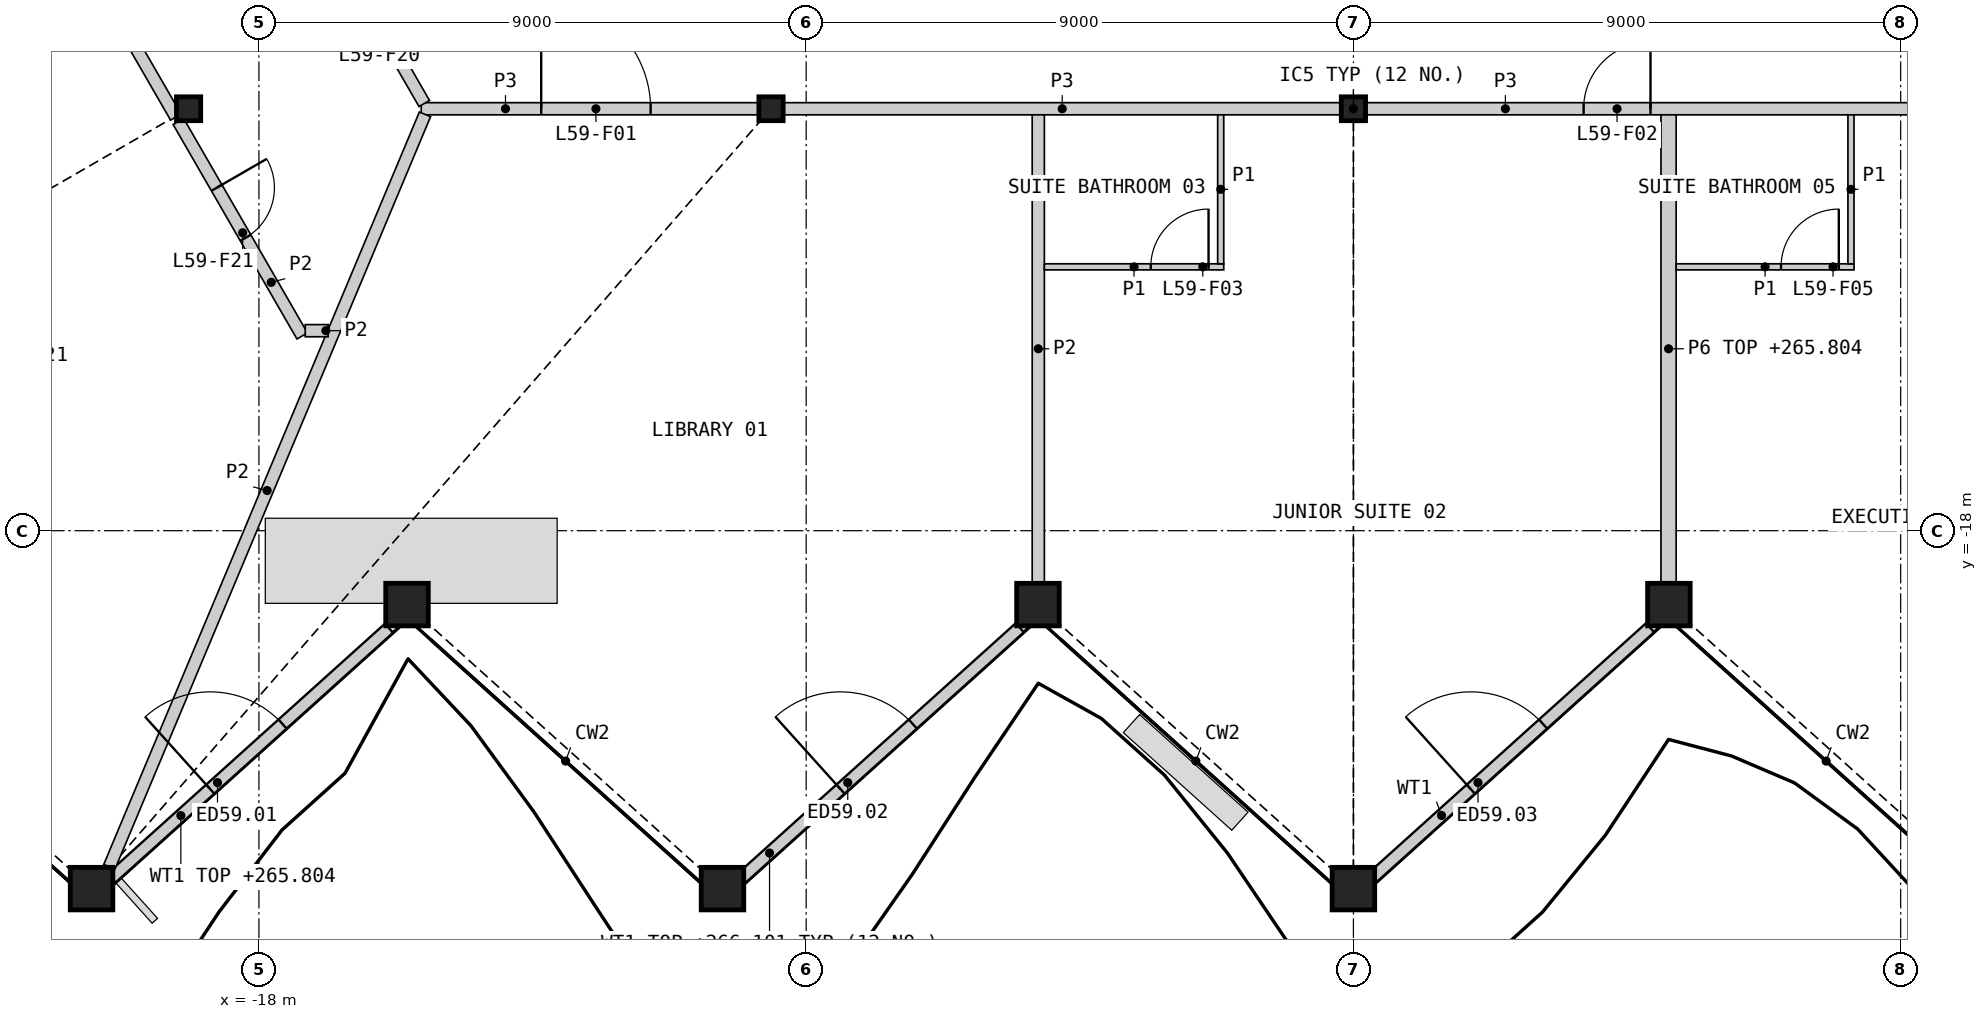
"""IFC4 building model, lengths in metres.
Left out: names, types, materials, properties, quantities, classifications, styles, units other than length and angle.
Written with IfcOpenShell. Run it as: python <this file> out.ifc"""

import sys

from ifc_helpers import new_model, si_unit, direction, frame, frame_2d, origin, origin_2d, place, context, subcontext, project, spatial, rectangle, hollow_rectangle, i_section, extrude, element, fill, save


model = new_model("IFC4")
c1 = context("Model", 3, precision=1e-05, world=origin(), true_north=direction((0.0, 1.0)))
c2 = subcontext(c1, "Body", "Model", "MODEL_VIEW")
j1 = project(units=[si_unit("LENGTHUNIT", "METRE"), si_unit("PLANEANGLEUNIT", "RADIAN")], contexts=[c1])
p1 = place(None, origin())
s1 = spatial("IfcSite", under=j1, at=p1, CompositionType="ELEMENT")
p2 = place(p1, origin())
s2 = spatial("IfcBuilding", under=s1, at=p2, CompositionType="ELEMENT")
p3 = place(p2, frame((0.0, 0.0, 263.4)))
s3 = spatial("IfcBuildingStorey", under=s2, at=p3, CompositionType="ELEMENT", Elevation=263.4)
for number, where, z_axis, x_axis in (
    (1, (-20.753, -23.887, 0.0), (0.0, 0.0, 1.0), (1.0, 0.0, 0.0)),
    (2, (-15.565, -19.215, 0.0), (0.0, 0.0, 1.0), (1.0, 0.0, 0.0)),
    (3, (-10.376, -23.887, 0.0), (0.0, 0.0, 1.0), (1.0, 0.0, 0.0)),
    (4, (-5.188, -19.215, 0.0), (0.0, 0.0, 1.0), (1.0, 0.0, 0.0)),
    (5, (0.0, -23.887, 0.0), (0.0, 0.0, 1.0), (1.0, 0.0, 0.0)),
    (6, (5.188, -19.215, 0.0), (0.0, 0.0, 1.0), (1.0, 0.0, 0.0)),
):
    element("IfcColumn", number, at=place(p3, frame(where, z_axis=z_axis, x_axis=x_axis)), inside=s3, PredefinedType="COLUMN", context=c2, shape_type="SweptSolid", body=[
        extrude(hollow_rectangle(XDim=0.7, YDim=0.7, WallThickness=0.045, at=origin_2d()), origin(), (0.0, 0.0, 1.0), 3.6),
    ])
for number, where, z_axis, x_axis in (
    (7, (-19.157, -11.06, 0.0), (0.0, 0.0, 1.0), (1.0, 0.0, 0.0)),
    (8, (-9.578, -11.06, 0.0), (0.0, 0.0, 1.0), (1.0, 0.0, 0.0)),
    (9, (0.0, -11.06, 0.0), (0.0, 0.0, 1.0), (1.0, 0.0, 0.0)),
):
    element("IfcColumn", number, at=place(p3, frame(where, z_axis=z_axis, x_axis=x_axis)), inside=s3, PredefinedType="COLUMN", context=c2, shape_type="SweptSolid", body=[
        extrude(i_section(OverallWidth=0.399, OverallDepth=0.393, WebThickness=0.023, FlangeThickness=0.037, at=origin_2d()), origin(), (0.0, 0.0, 1.0), 3.6),
    ])
p4 = place(p3, frame((-20.425, -23.713, 0.0), z_axis=(0.0, 0.0, 1.0), x_axis=(0.74316565197, 0.669107475472, 0.0)))
e10 = element("IfcWall", 10, at=p4, inside=s3, PredefinedType="SOLIDWALL", context=c2, shape_type="SweptSolid", body=[
    extrude(rectangle(XDim=6.142, YDim=0.2, at=frame_2d((3.071, 0.0))), origin(), (0.0, 0.0, 1.0), 2.404),
])
p5 = place(p4, frame((2.186, 0.0, 0.0)))
e11 = element("IfcOpeningElement", 11, at=p5, cuts=e10, PredefinedType="OPENING", context=c2, shape_type="SweptSolid", body=[
    extrude(rectangle(XDim=1.6, YDim=2.4, at=frame_2d((0.8, 1.2))), frame((0.0, 0.11, 0.0), z_axis=(0.0, -1.0, 0.0), x_axis=(1.0, 0.0, 0.0)), (0.0, 0.0, 1.0), 0.22),
])
p6 = place(p3, frame((-10.06, -23.713, 0.0), z_axis=(0.0, 0.0, 1.0), x_axis=(0.74316789204, 0.669104987458, 0.0)))
e12 = element("IfcWall", 12, at=p6, inside=s3, PredefinedType="SOLIDWALL", context=c2, shape_type="SweptSolid", body=[
    extrude(rectangle(XDim=6.154, YDim=0.2, at=frame_2d((3.077, 0.0))), origin(), (0.0, 0.0, 1.0), 2.701),
])
p7 = place(p6, frame((2.186, 0.0, 0.0)))
e13 = element("IfcOpeningElement", 13, at=p7, cuts=e12, PredefinedType="OPENING", context=c2, shape_type="SweptSolid", body=[
    extrude(rectangle(XDim=1.6, YDim=2.4, at=frame_2d((0.8, 1.2))), frame((0.0, 0.11, 0.0), z_axis=(0.0, -1.0, 0.0), x_axis=(1.0, 0.0, 0.0)), (0.0, 0.0, 1.0), 0.22),
])
p8 = place(p3, frame((0.305, -23.713, 0.0), z_axis=(0.0, 0.0, 1.0), x_axis=(0.74316789204, 0.669104987458, 0.0)))
e14 = element("IfcWall", 14, at=p8, inside=s3, PredefinedType="SOLIDWALL", context=c2, shape_type="SweptSolid", body=[
    extrude(rectangle(XDim=6.154, YDim=0.2, at=frame_2d((3.077, 0.0))), origin(), (0.0, 0.0, 1.0), 2.701),
])
p9 = place(p8, frame((2.186, 0.0, 0.0)))
e15 = element("IfcOpeningElement", 15, at=p9, cuts=e14, PredefinedType="OPENING", context=c2, shape_type="SweptSolid", body=[
    extrude(rectangle(XDim=1.6, YDim=2.4, at=frame_2d((0.8, 1.2))), frame((0.0, 0.11, 0.0), z_axis=(0.0, -1.0, 0.0), x_axis=(1.0, 0.0, 0.0)), (0.0, 0.0, 1.0), 0.22),
])
p10 = place(p3, frame((0.209, -11.06, 0.0), z_axis=(0.0, 0.0, 1.0), x_axis=(1.0, 0.0, 0.0)))
e16 = element("IfcWall", 16, at=p10, inside=s3, PredefinedType="PARTITIONING", context=c2, shape_type="SweptSolid", body=[
    extrude(rectangle(XDim=9.159, YDim=0.2, at=frame_2d((4.58, 0.0))), origin(), (0.0, 0.0, 1.0), 3.25),
])
p11 = place(p10, frame((3.576, 0.0, 0.0)))
e17 = element("IfcOpeningElement", 17, at=p11, cuts=e16, PredefinedType="OPENING", context=c2, shape_type="SweptSolid", body=[
    extrude(rectangle(XDim=1.1, YDim=2.1, at=frame_2d((0.55, 1.05))), frame((0.0, 0.11, 0.0), z_axis=(0.0, -1.0, 0.0), x_axis=(1.0, 0.0, 0.0)), (0.0, 0.0, 1.0), 0.22),
])
p12 = place(p3, frame((-9.369, -11.06, 0.0), z_axis=(0.0, 0.0, 1.0), x_axis=(1.0, 0.0, 0.0)))
e18 = element("IfcWall", 18, at=p12, inside=s3, PredefinedType="PARTITIONING", context=c2, shape_type="SweptSolid", body=[
    extrude(rectangle(XDim=9.159, YDim=0.2, at=frame_2d((4.58, 0.0))), origin(), (0.0, 0.0, 1.0), 3.25),
])
p13 = place(p3, frame((5.183, -18.855, 0.0), z_axis=(0.0, 0.0, 1.0), x_axis=(0.0, 1.0, 0.0)))
e19 = element("IfcWall", 19, at=p13, inside=s3, PredefinedType="PARTITIONING", context=c2, shape_type="SweptSolid", body=[
    extrude(rectangle(XDim=7.695, YDim=0.25, at=frame_2d((3.848, 0.0))), origin(), (0.0, 0.0, 1.0), 2.404),
])
p14 = place(p3, frame((-15.331, -11.06, 0.0), z_axis=(0.0, 0.0, 1.0), x_axis=(1.0, 0.0, 0.0)))
e20 = element("IfcWall", 20, at=p14, inside=s3, PredefinedType="PARTITIONING", context=c2, shape_type="SweptSolid", body=[
    extrude(rectangle(XDim=5.543, YDim=0.2, at=frame_2d((2.771, 0.0))), origin(), (0.0, 0.0, 1.0), 3.25),
])
p15 = place(p14, frame((1.973, 0.0, 0.0)))
e21 = element("IfcOpeningElement", 21, at=p15, cuts=e20, PredefinedType="OPENING", context=c2, shape_type="SweptSolid", body=[
    extrude(rectangle(XDim=1.8, YDim=2.1, at=frame_2d((0.9, 1.05))), frame((0.0, 0.11, 0.0), z_axis=(0.0, -1.0, 0.0), x_axis=(1.0, 0.0, 0.0)), (0.0, 0.0, 1.0), 0.22),
])
p16 = place(p3, frame((-17.194, -7.66, 0.0), z_axis=(0.0, 0.0, 1.0), x_axis=(0.499989446428, -0.866031496806, 0.0)))
e22 = element("IfcWall", 22, at=p16, inside=s3, PredefinedType="PARTITIONING", context=c2, shape_type="SweptSolid", body=[
    extrude(rectangle(XDim=3.826, YDim=0.2, at=frame_2d((1.913, 0.0))), origin(), (0.0, 0.0, 1.0), 3.25),
])
p17 = place(p16, frame((1.49, 0.0, 0.0)))
e23 = element("IfcOpeningElement", 23, at=p17, cuts=e22, PredefinedType="OPENING", context=c2, shape_type="SweptSolid", body=[
    extrude(rectangle(XDim=0.95, YDim=2.1, at=frame_2d((0.475, 1.05))), frame((0.0, 0.11, 0.0), z_axis=(0.0, -1.0, 0.0), x_axis=(1.0, 0.0, 0.0)), (0.0, 0.0, 1.0), 0.22),
])
p18 = place(p3, frame((-20.46, -23.527, 0.0), z_axis=(0.0, 0.0, 1.0), x_axis=(0.386788567553, 0.922168424969, 0.0)))
e24 = element("IfcWall", 24, at=p18, inside=s3, PredefinedType="PARTITIONING", context=c2, shape_type="SweptSolid", body=[
    extrude(rectangle(XDim=13.419, YDim=0.2, at=frame_2d((6.709, 0.0))), origin(), (0.0, 0.0, 1.0), 2.404),
])
p19 = place(p3, frame((-5.183, -18.855, 0.0), z_axis=(0.0, 0.0, 1.0), x_axis=(0.0, 1.0, 0.0)))
e25 = element("IfcWall", 25, at=p19, inside=s3, PredefinedType="PARTITIONING", context=c2, shape_type="SweptSolid", body=[
    extrude(rectangle(XDim=7.695, YDim=0.2, at=frame_2d((3.848, 0.0))), origin(), (0.0, 0.0, 1.0), 2.404),
])
p20 = place(p3, frame((-22.866, -5.136, 0.0), z_axis=(0.0, 0.0, 1.0), x_axis=(0.499988162555, -0.866032238029, 0.0)))
e26 = element("IfcWall", 26, at=p20, inside=s3, PredefinedType="PARTITIONING", context=c2, shape_type="SweptSolid", body=[
    extrude(rectangle(XDim=6.999, YDim=0.2, at=frame_2d((3.5, 0.0))), origin(), (0.0, 0.0, 1.0), 2.404),
])
p21 = place(p3, frame((-19.325, -11.27, 0.0), z_axis=(0.0, 0.0, 1.0), x_axis=(0.500000928893, -0.866024867487, 0.0)))
e27 = element("IfcWall", 27, at=p21, inside=s3, PredefinedType="PARTITIONING", context=c2, shape_type="SweptSolid", body=[
    extrude(rectangle(XDim=4.073, YDim=0.2, at=frame_2d((2.036, 0.0))), origin(), (0.0, 0.0, 1.0), 2.404),
])
p22 = place(p21, frame((1.259, 0.0, 0.0)))
e28 = element("IfcOpeningElement", 28, at=p22, cuts=e27, PredefinedType="OPENING", context=c2, shape_type="SweptSolid", body=[
    extrude(rectangle(XDim=0.95, YDim=2.1, at=frame_2d((0.475, 1.05))), frame((0.0, 0.11, 0.0), z_axis=(0.0, -1.0, 0.0), x_axis=(1.0, 0.0, 0.0)), (0.0, 0.0, 1.0), 0.22),
])
p23 = place(p3, frame((-17.238, -14.71, 0.0), z_axis=(0.0, 0.0, 1.0), x_axis=(1.0, 0.0, 0.0)))
e29 = element("IfcWall", 29, at=p23, inside=s3, PredefinedType="PARTITIONING", context=c2, shape_type="SweptSolid", body=[
    extrude(rectangle(XDim=0.376, YDim=0.2, at=frame_2d((0.188, 0.0))), origin(), (0.0, 0.0, 1.0), 2.404),
])
p24 = place(p3, frame((5.308, -13.66, 0.0), z_axis=(0.0, 0.0, 1.0), x_axis=(1.0, 0.0, 0.0)))
e30 = element("IfcWall", 30, at=p24, inside=s3, PredefinedType="PARTITIONING", context=c2, shape_type="SweptSolid", body=[
    extrude(rectangle(XDim=2.925, YDim=0.1, at=frame_2d((1.462, 0.0))), origin(), (0.0, 0.0, 1.0), 2.404),
])
p25 = place(p24, frame((1.725, 0.0, 0.0)))
e31 = element("IfcOpeningElement", 31, at=p25, cuts=e30, PredefinedType="OPENING", context=c2, shape_type="SweptSolid", body=[
    extrude(rectangle(XDim=0.95, YDim=2.1, at=frame_2d((0.475, 1.05))), frame((0.0, 0.06, 0.0), z_axis=(0.0, -1.0, 0.0), x_axis=(1.0, 0.0, 0.0)), (0.0, 0.0, 1.0), 0.12),
])
p26 = place(p3, frame((-5.083, -13.66, 0.0), z_axis=(0.0, 0.0, 1.0), x_axis=(1.0, 0.0, 0.0)))
e32 = element("IfcWall", 32, at=p26, inside=s3, PredefinedType="PARTITIONING", context=c2, shape_type="SweptSolid", body=[
    extrude(rectangle(XDim=2.95, YDim=0.1, at=frame_2d((1.475, 0.0))), origin(), (0.0, 0.0, 1.0), 2.404),
])
p27 = place(p26, frame((1.75, 0.0, 0.0)))
e33 = element("IfcOpeningElement", 33, at=p27, cuts=e32, PredefinedType="OPENING", context=c2, shape_type="SweptSolid", body=[
    extrude(rectangle(XDim=0.95, YDim=2.1, at=frame_2d((0.475, 1.05))), frame((0.0, 0.06, 0.0), z_axis=(0.0, -1.0, 0.0), x_axis=(1.0, 0.0, 0.0)), (0.0, 0.0, 1.0), 0.12),
])
for number, where, z_axis, x_axis in (
    (34, (-2.183, -13.61, 0.0), (0.0, 0.0, 1.0), (0.0, 1.0, 0.0)),
    (35, (8.183, -13.61, 0.0), (0.0, 0.0, 1.0), (0.0, 1.0, 0.0)),
):
    element("IfcWall", number, at=place(p3, frame(where, z_axis=z_axis, x_axis=x_axis)), inside=s3, PredefinedType="PARTITIONING", context=c2, shape_type="SweptSolid", body=[
        extrude(rectangle(XDim=2.45, YDim=0.1, at=frame_2d((1.225, 0.0))), origin(), (0.0, 0.0, 1.0), 2.404),
    ])
p28 = place(p5, origin())
e36 = element("IfcDoor", 36, at=p28, inside=s3, OperationType="DOUBLE_DOOR_SINGLE_SWING", PredefinedType="DOOR", context=c2, shape_type="SweptSolid", body=[
    extrude(rectangle(XDim=1.6, YDim=2.4, at=frame_2d((0.8, 1.2))), frame((0.0, 0.025, 0.0), z_axis=(0.0, -1.0, 0.0), x_axis=(1.0, 0.0, 0.0)), (0.0, 0.0, 1.0), 0.05),
])
fill(e11, e36)
p29 = place(p7, origin())
e37 = element("IfcDoor", 37, at=p29, inside=s3, OperationType="DOUBLE_DOOR_SINGLE_SWING", PredefinedType="DOOR", context=c2, shape_type="SweptSolid", body=[
    extrude(rectangle(XDim=1.6, YDim=2.4, at=frame_2d((0.8, 1.2))), frame((0.0, 0.025, 0.0), z_axis=(0.0, -1.0, 0.0), x_axis=(1.0, 0.0, 0.0)), (0.0, 0.0, 1.0), 0.05),
])
fill(e13, e37)
p30 = place(p9, origin())
e38 = element("IfcDoor", 38, at=p30, inside=s3, OperationType="DOUBLE_DOOR_SINGLE_SWING", PredefinedType="DOOR", context=c2, shape_type="SweptSolid", body=[
    extrude(rectangle(XDim=1.6, YDim=2.4, at=frame_2d((0.8, 1.2))), frame((0.0, 0.025, 0.0), z_axis=(0.0, -1.0, 0.0), x_axis=(1.0, 0.0, 0.0)), (0.0, 0.0, 1.0), 0.05),
])
fill(e15, e38)
p31 = place(p15, origin())
e39 = element("IfcDoor", 39, at=p31, inside=s3, OperationType="DOUBLE_DOOR_SINGLE_SWING", PredefinedType="DOOR", context=c2, shape_type="SweptSolid", body=[
    extrude(rectangle(XDim=1.8, YDim=2.1, at=frame_2d((0.9, 1.05))), frame((0.0, 0.025, 0.0), z_axis=(0.0, -1.0, 0.0), x_axis=(1.0, 0.0, 0.0)), (0.0, 0.0, 1.0), 0.05),
])
fill(e21, e39)
p32 = place(p11, origin())
e40 = element("IfcDoor", 40, at=p32, inside=s3, OperationType="SINGLE_SWING_RIGHT", PredefinedType="DOOR", context=c2, shape_type="SweptSolid", body=[
    extrude(rectangle(XDim=1.1, YDim=2.1, at=frame_2d((0.55, 1.05))), frame((0.0, 0.025, 0.0), z_axis=(0.0, -1.0, 0.0), x_axis=(1.0, 0.0, 0.0)), (0.0, 0.0, 1.0), 0.05),
])
fill(e17, e40)
p33 = place(p27, origin())
e41 = element("IfcDoor", 41, at=p33, inside=s3, OperationType="SINGLE_SWING_RIGHT", PredefinedType="DOOR", context=c2, shape_type="SweptSolid", body=[
    extrude(rectangle(XDim=0.95, YDim=2.1, at=frame_2d((0.475, 1.05))), frame((0.0, 0.025, 0.0), z_axis=(0.0, -1.0, 0.0), x_axis=(1.0, 0.0, 0.0)), (0.0, 0.0, 1.0), 0.05),
])
fill(e33, e41)
p34 = place(p25, origin())
e42 = element("IfcDoor", 42, at=p34, inside=s3, OperationType="SINGLE_SWING_RIGHT", PredefinedType="DOOR", context=c2, shape_type="SweptSolid", body=[
    extrude(rectangle(XDim=0.95, YDim=2.1, at=frame_2d((0.475, 1.05))), frame((0.0, 0.025, 0.0), z_axis=(0.0, -1.0, 0.0), x_axis=(1.0, 0.0, 0.0)), (0.0, 0.0, 1.0), 0.05),
])
fill(e31, e42)
p35 = place(p22, origin())
e43 = element("IfcDoor", 43, at=p35, inside=s3, OperationType="SINGLE_SWING_LEFT", PredefinedType="DOOR", context=c2, shape_type="SweptSolid", body=[
    extrude(rectangle(XDim=0.95, YDim=2.1, at=frame_2d((0.475, 1.05))), frame((0.0, 0.025, 0.0), z_axis=(0.0, -1.0, 0.0), x_axis=(1.0, 0.0, 0.0)), (0.0, 0.0, 1.0), 0.05),
])
fill(e28, e43)
save(model, sys.argv[1])
